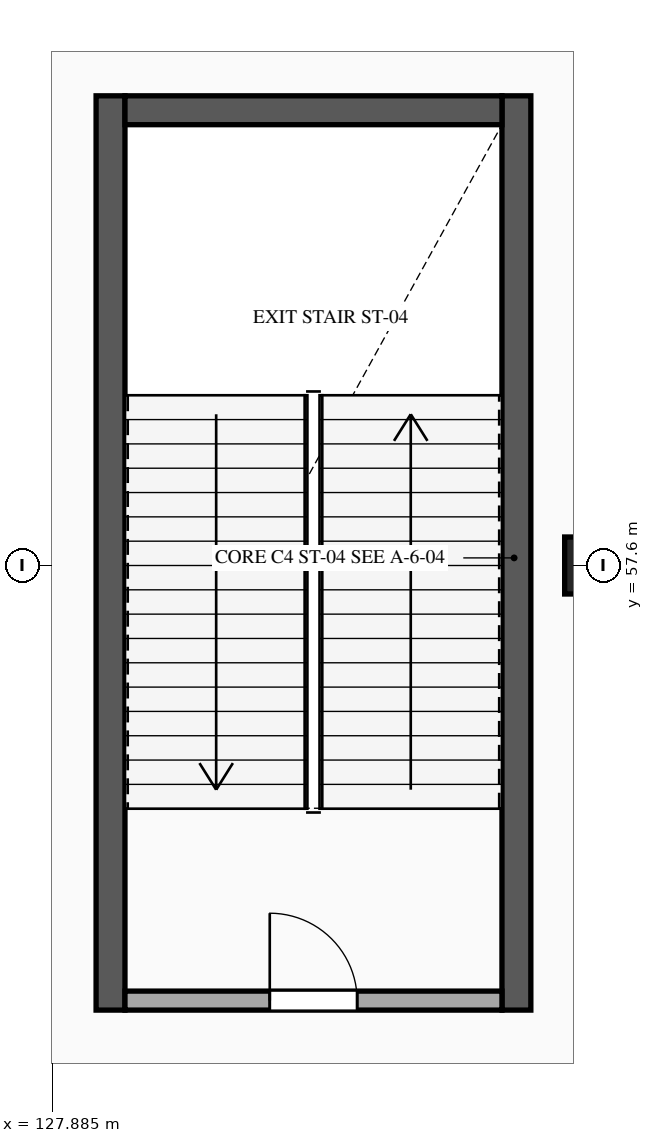
"""IFC4 building model, lengths in metres.
Left out: names, types, materials, properties, quantities, classifications, styles, units other than length and angle.
Written with IfcOpenShell. Run it as: python <this file> out.ifc"""

import sys

from ifc_helpers import new_model, si_unit, direction, frame, frame_2d, origin, origin_2d, place, context, subcontext, project, spatial, rectangle, extrude, element, fill, save


model = new_model("IFC4")
c1 = context("Model", 3, precision=1e-05, world=origin(), true_north=direction((0.0, 1.0)))
c2 = subcontext(c1, "Body", "Model", "MODEL_VIEW")
j1 = project(units=[si_unit("LENGTHUNIT", "METRE"), si_unit("PLANEANGLEUNIT", "RADIAN")], contexts=[c1])
p1 = place(None, origin())
s1 = spatial("IfcSite", under=j1, at=p1, CompositionType="ELEMENT")
p2 = place(p1, origin())
s2 = spatial("IfcBuilding", under=s1, at=p2, CompositionType="ELEMENT")
p3 = place(p2, frame((0.0, 0.0, 5.4)))
s3 = spatial("IfcBuildingStorey", under=s2, at=p3, CompositionType="ELEMENT", Elevation=5.4)
p4 = place(p3, frame((135.0, 57.6, 0.0), z_axis=(0.0, 0.0, 1.0), x_axis=(1.0, 0.0, 0.0)))
e1 = element("IfcColumn", 1, at=p4, inside=s3, PredefinedType="COLUMN", context=c2, shape_type="SweptSolid", body=[
    extrude(rectangle(XDim=0.75, YDim=0.75, at=origin_2d()), origin(), (0.0, 0.0, 1.0), 5.4),
])
for number, where, z_axis, x_axis in (
    (2, (128.65, 51.75, 0.0), (0.0, 0.0, 1.0), (0.0, 1.0, 0.0)),
    (3, (133.99, 63.78, 0.0), (0.0, 0.0, 1.0), (0.0, -1.0, 0.0)),
):
    element("IfcWall", number, at=place(p3, frame(where, z_axis=z_axis, x_axis=x_axis)), inside=s3, PredefinedType="SHEAR", context=c2, shape_type="SweptSolid", body=[
        extrude(rectangle(XDim=12.03, YDim=0.38, at=frame_2d((6.015, 0.0))), origin(), (0.0, 0.0, 1.0), 5.12),
    ])
p5 = place(p3, frame((128.84, 63.59, 0.0), z_axis=(0.0, 0.0, 1.0), x_axis=(1.0, 0.0, 0.0)))
e4 = element("IfcWall", 4, at=p5, inside=s3, PredefinedType="SHEAR", context=c2, shape_type="SweptSolid", body=[
    extrude(rectangle(XDim=4.96, YDim=0.38, at=frame_2d((2.48, 0.0))), origin(), (0.0, 0.0, 1.0), 5.12),
])
p6 = place(p3, frame((128.84, 51.875, 0.0), z_axis=(0.0, 0.0, 1.0), x_axis=(1.0, 0.0, 0.0)))
e5 = element("IfcWall", 5, at=p6, inside=s3, PredefinedType="STANDARD", context=c2, shape_type="SweptSolid", body=[
    extrude(rectangle(XDim=4.96, YDim=0.25, at=frame_2d((2.48, 0.0))), origin(), (0.0, 0.0, 1.0), 5.12),
])
p7 = place(p6, frame((1.905, 0.0, 0.0)))
e6 = element("IfcOpeningElement", 6, at=p7, cuts=e5, PredefinedType="OPENING", context=c2, shape_type="SweptSolid", body=[
    extrude(rectangle(XDim=1.15, YDim=2.2, at=frame_2d((0.575, 1.1))), frame((0.0, 0.135, 0.0), z_axis=(0.0, -1.0, 0.0), x_axis=(1.0, 0.0, 0.0)), (0.0, 0.0, 1.0), 0.27),
])
p8 = place(p7, origin())
e7 = element("IfcDoor", 7, at=p8, inside=s3, OperationType="SINGLE_SWING_LEFT", PredefinedType="DOOR", context=c2, shape_type="SweptSolid", body=[
    extrude(rectangle(XDim=1.15, YDim=2.2, at=frame_2d((0.575, 1.1))), frame((0.0, 0.025, 0.0), z_axis=(0.0, -1.0, 0.0), x_axis=(1.0, 0.0, 0.0)), (0.0, 0.0, 1.0), 0.05),
])
fill(e6, e7)
save(model, sys.argv[1])
